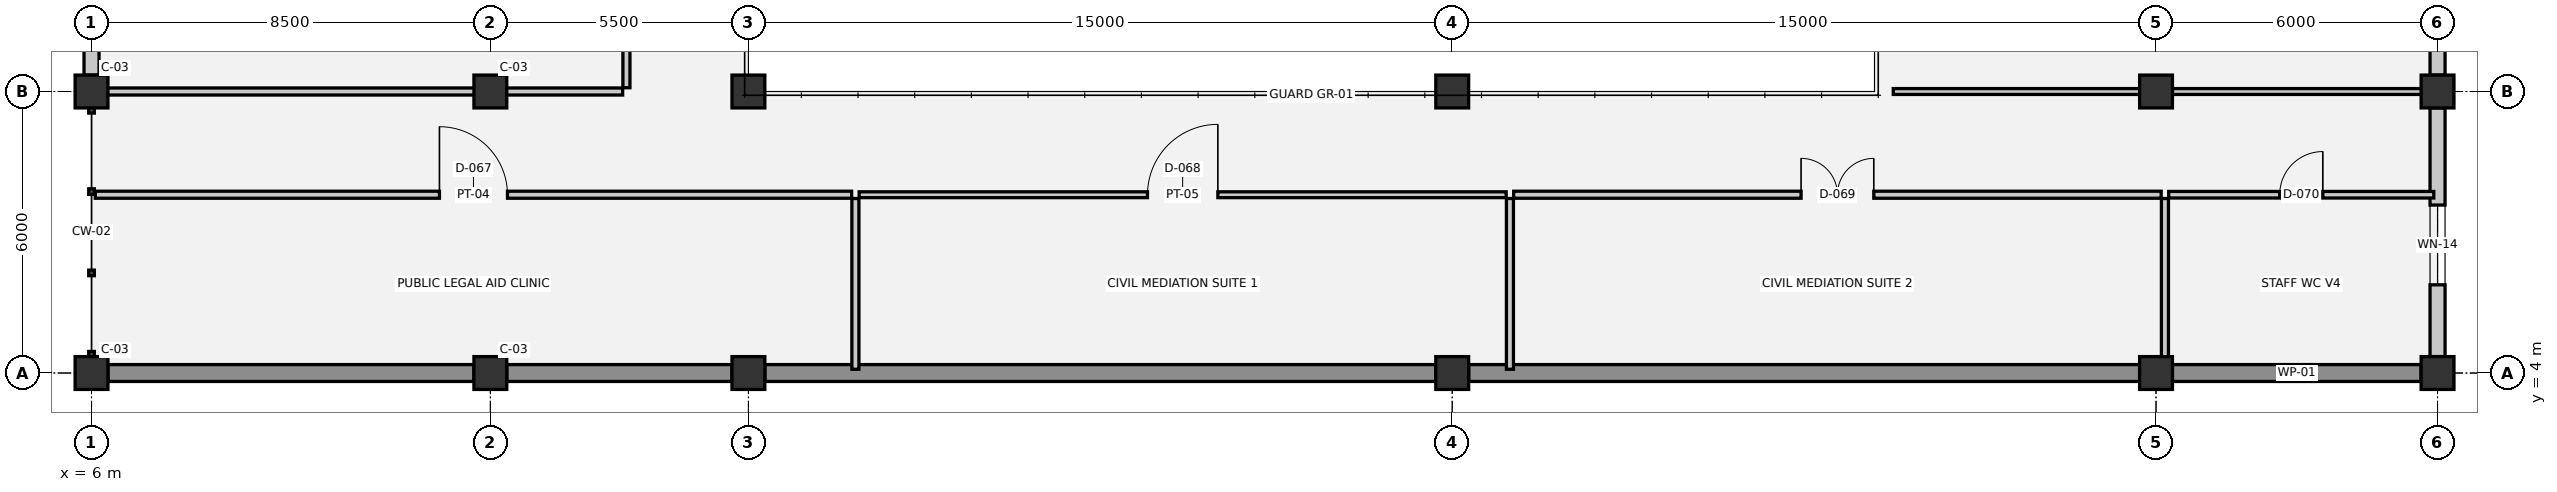
"""IFC4 building model, lengths in metres.
Left out: names, types, materials, properties, quantities, classifications, styles, units other than length and angle.
Written with IfcOpenShell. Run it as: python <this file> out.ifc"""

import sys

from ifc_helpers import new_model, si_unit, direction, frame, frame_2d, origin, origin_2d, place, context, subcontext, project, spatial, rectangle, extrude, element, fill, save


model = new_model("IFC4")
c1 = context("Model", 3, precision=1e-05, world=origin(), true_north=direction((0.0, 1.0)))
c2 = subcontext(c1, "Body", "Model", "MODEL_VIEW")
j1 = project(units=[si_unit("LENGTHUNIT", "METRE"), si_unit("PLANEANGLEUNIT", "RADIAN")], contexts=[c1])
p1 = place(None, origin())
s1 = spatial("IfcSite", under=j1, at=p1, CompositionType="ELEMENT")
p2 = place(p1, origin())
s2 = spatial("IfcBuilding", under=s1, at=p2, CompositionType="ELEMENT")
p3 = place(p2, frame((0.0, 0.0, 5.4)))
s3 = spatial("IfcBuildingStorey", under=s2, at=p3, CompositionType="ELEMENT", Elevation=5.4)
for number, where, z_axis, x_axis in (
    (1, (6.0, 4.0, 0.0), (0.0, 0.0, 1.0), (1.0, 0.0, 0.0)),
    (2, (6.0, 10.0, 0.0), (0.0, 0.0, 1.0), (1.0, 0.0, 0.0)),
    (3, (14.5, 4.0, 0.0), (0.0, 0.0, 1.0), (1.0, 0.0, 0.0)),
    (4, (14.5, 10.0, 0.0), (0.0, 0.0, 1.0), (1.0, 0.0, 0.0)),
    (5, (20.0, 4.0, 0.0), (0.0, 0.0, 1.0), (1.0, 0.0, 0.0)),
    (6, (20.0, 10.0, 0.0), (0.0, 0.0, 1.0), (1.0, 0.0, 0.0)),
    (7, (35.0, 4.0, 0.0), (0.0, 0.0, 1.0), (1.0, 0.0, 0.0)),
    (8, (35.0, 10.0, 0.0), (0.0, 0.0, 1.0), (1.0, 0.0, 0.0)),
    (9, (50.0, 4.0, 0.0), (0.0, 0.0, 1.0), (1.0, 0.0, 0.0)),
    (10, (50.0, 10.0, 0.0), (0.0, 0.0, 1.0), (1.0, 0.0, 0.0)),
    (11, (56.0, 4.0, 0.0), (0.0, 0.0, 1.0), (1.0, 0.0, 0.0)),
    (12, (56.0, 10.0, 0.0), (0.0, 0.0, 1.0), (1.0, 0.0, 0.0)),
):
    element("IfcColumn", number, at=place(p3, frame(where, z_axis=z_axis, x_axis=x_axis)), inside=s3, PredefinedType="COLUMN", context=c2, shape_type="SweptSolid", body=[
        extrude(rectangle(XDim=0.7, YDim=0.7, at=origin_2d()), origin(), (0.0, 0.0, 1.0), 4.5),
    ])
p4 = place(p3, frame((6.0, 10.35, 0.0), z_axis=(0.0, 0.0, 1.0), x_axis=(0.0, 1.0, 0.0)))
e13 = element("IfcWall", 13, at=p4, inside=s3, PredefinedType="SOLIDWALL", context=c2, shape_type="SweptSolid", body=[
    extrude(rectangle(XDim=6.3, YDim=0.32, at=frame_2d((3.15, 0.0))), origin(), (0.0, 0.0, 1.0), 3.26),
])
p5 = place(p4, frame((2.3, 0.0, 0.9)))
e14 = element("IfcOpeningElement", 14, at=p5, cuts=e13, PredefinedType="OPENING", context=c2, shape_type="SweptSolid", body=[
    extrude(rectangle(XDim=1.7, YDim=1.9, at=frame_2d((0.85, 0.95))), frame((0.0, 0.17, 0.0), z_axis=(0.0, -1.0, 0.0), x_axis=(1.0, 0.0, 0.0)), (0.0, 0.0, 1.0), 0.34),
])
p6 = place(p3, frame((56.0, 16.65, 0.0), z_axis=(0.0, 0.0, 1.0), x_axis=(0.0, -1.0, 0.0)))
e15 = element("IfcWall", 15, at=p6, inside=s3, PredefinedType="SOLIDWALL", context=c2, shape_type="SweptSolid", body=[
    extrude(rectangle(XDim=6.3, YDim=0.32, at=frame_2d((3.15, 0.0))), origin(), (0.0, 0.0, 1.0), 3.26),
])
p7 = place(p6, frame((1.925, 0.0, 0.0)))
e16 = element("IfcOpeningElement", 16, at=p7, cuts=e15, PredefinedType="OPENING", context=c2, shape_type="SweptSolid", body=[
    extrude(rectangle(XDim=1.65, YDim=2.2, at=frame_2d((0.825, 1.1))), frame((0.0, 0.17, 0.0), z_axis=(0.0, -1.0, 0.0), x_axis=(1.0, 0.0, 0.0)), (0.0, 0.0, 1.0), 0.34),
])
p8 = place(p3, frame((56.0, 9.65, 0.0), z_axis=(0.0, 0.0, 1.0), x_axis=(0.0, -1.0, 0.0)))
e17 = element("IfcWall", 17, at=p8, inside=s3, PredefinedType="SOLIDWALL", context=c2, shape_type="SweptSolid", body=[
    extrude(rectangle(XDim=5.3, YDim=0.32, at=frame_2d((2.65, 0.0))), origin(), (0.0, 0.0, 1.0), 3.26),
])
p9 = place(p8, frame((2.07, 0.0, 0.9)))
e18 = element("IfcOpeningElement", 18, at=p9, cuts=e17, PredefinedType="OPENING", context=c2, shape_type="SweptSolid", body=[
    extrude(rectangle(XDim=1.7, YDim=1.9, at=frame_2d((0.85, 0.95))), frame((0.0, 0.17, 0.0), z_axis=(0.0, -1.0, 0.0), x_axis=(1.0, 0.0, 0.0)), (0.0, 0.0, 1.0), 0.34),
])
p10 = place(p3, frame((55.65, 4.0, 0.0), z_axis=(0.0, 0.0, 1.0), x_axis=(-1.0, 0.0, 0.0)))
e19 = element("IfcWall", 19, at=p10, inside=s3, PredefinedType="SOLIDWALL", context=c2, shape_type="SweptSolid", body=[
    extrude(rectangle(XDim=5.3, YDim=0.36, at=frame_2d((2.65, 0.0))), origin(), (0.0, 0.0, 1.0), 4.24),
])
for number, where, z_axis, x_axis in (
    (20, (49.65, 4.0, 0.0), (0.0, 0.0, 1.0), (-1.0, 0.0, 0.0)),
    (21, (34.65, 4.0, 0.0), (0.0, 0.0, 1.0), (-1.0, 0.0, 0.0)),
):
    element("IfcWall", number, at=place(p3, frame(where, z_axis=z_axis, x_axis=x_axis)), inside=s3, PredefinedType="SOLIDWALL", context=c2, shape_type="SweptSolid", body=[
        extrude(rectangle(XDim=14.3, YDim=0.36, at=frame_2d((7.15, 0.0))), origin(), (0.0, 0.0, 1.0), 4.24),
    ])
p11 = place(p3, frame((19.65, 4.0, 0.0), z_axis=(0.0, 0.0, 1.0), x_axis=(-1.0, 0.0, 0.0)))
e22 = element("IfcWall", 22, at=p11, inside=s3, PredefinedType="SOLIDWALL", context=c2, shape_type="SweptSolid", body=[
    extrude(rectangle(XDim=4.8, YDim=0.36, at=frame_2d((2.4, 0.0))), origin(), (0.0, 0.0, 1.0), 4.24),
])
p12 = place(p3, frame((14.15, 4.0, 0.0), z_axis=(0.0, 0.0, 1.0), x_axis=(-1.0, 0.0, 0.0)))
e23 = element("IfcWall", 23, at=p12, inside=s3, PredefinedType="SOLIDWALL", context=c2, shape_type="SweptSolid", body=[
    extrude(rectangle(XDim=7.8, YDim=0.36, at=frame_2d((3.9, 0.0))), origin(), (0.0, 0.0, 1.0), 4.24),
])
p13 = place(p3, frame((6.08, 7.8, 0.0), z_axis=(0.0, 0.0, 1.0), x_axis=(1.0, 0.0, 0.0)))
e24 = element("IfcWall", 24, at=p13, inside=s3, PredefinedType="PARTITIONING", context=c2, shape_type="SweptSolid", body=[
    extrude(rectangle(XDim=16.12, YDim=0.15, at=frame_2d((8.06, 0.0))), origin(), (0.0, 0.0, 1.0), 4.14),
])
p14 = place(p13, frame((7.335, 0.0, 0.0)))
e25 = element("IfcOpeningElement", 25, at=p14, cuts=e24, PredefinedType="OPENING", context=c2, shape_type="SweptSolid", body=[
    extrude(rectangle(XDim=1.45, YDim=2.25, at=frame_2d((0.725, 1.125))), frame((0.0, 0.085, 0.0), z_axis=(0.0, -1.0, 0.0), x_axis=(1.0, 0.0, 0.0)), (0.0, 0.0, 1.0), 0.17),
])
p15 = place(p3, frame((22.36, 7.8, 0.0), z_axis=(0.0, 0.0, 1.0), x_axis=(1.0, 0.0, 0.0)))
e26 = element("IfcWall", 26, at=p15, inside=s3, PredefinedType="PARTITIONING", context=c2, shape_type="SweptSolid", body=[
    extrude(rectangle(XDim=13.79, YDim=0.125, at=frame_2d((6.895, 0.0))), origin(), (0.0, 0.0, 1.0), 4.14),
])
p16 = place(p15, frame((6.145, 0.0, 0.0)))
e27 = element("IfcOpeningElement", 27, at=p16, cuts=e26, PredefinedType="OPENING", context=c2, shape_type="SweptSolid", body=[
    extrude(rectangle(XDim=1.5, YDim=2.25, at=frame_2d((0.75, 1.125))), frame((0.0, 0.073, 0.0), z_axis=(0.0, -1.0, 0.0), x_axis=(1.0, 0.0, 0.0)), (0.0, 0.0, 1.0), 0.145),
])
p17 = place(p3, frame((36.31, 7.8, 0.0), z_axis=(0.0, 0.0, 1.0), x_axis=(1.0, 0.0, 0.0)))
e28 = element("IfcWall", 28, at=p17, inside=s3, PredefinedType="PARTITIONING", context=c2, shape_type="SweptSolid", body=[
    extrude(rectangle(XDim=13.8, YDim=0.15, at=frame_2d((6.9, 0.0))), origin(), (0.0, 0.0, 1.0), 4.14),
])
p18 = place(p17, frame((6.125, 0.0, 0.0)))
e29 = element("IfcOpeningElement", 29, at=p18, cuts=e28, PredefinedType="OPENING", context=c2, shape_type="SweptSolid", body=[
    extrude(rectangle(XDim=1.55, YDim=2.25, at=frame_2d((0.775, 1.125))), frame((0.0, 0.085, 0.0), z_axis=(0.0, -1.0, 0.0), x_axis=(1.0, 0.0, 0.0)), (0.0, 0.0, 1.0), 0.17),
])
p19 = place(p3, frame((50.27, 7.8, 0.0), z_axis=(0.0, 0.0, 1.0), x_axis=(1.0, 0.0, 0.0)))
e30 = element("IfcWall", 30, at=p19, inside=s3, PredefinedType="PLUMBINGWALL", context=c2, shape_type="SweptSolid", body=[
    extrude(rectangle(XDim=5.65, YDim=0.14, at=frame_2d((2.825, 0.0))), origin(), (0.0, 0.0, 1.0), 4.14),
])
p20 = place(p19, frame((2.365, 0.0, 0.0)))
e31 = element("IfcOpeningElement", 31, at=p20, cuts=e30, PredefinedType="OPENING", context=c2, shape_type="SweptSolid", body=[
    extrude(rectangle(XDim=0.92, YDim=2.1, at=frame_2d((0.46, 1.05))), frame((0.0, 0.08, 0.0), z_axis=(0.0, -1.0, 0.0), x_axis=(1.0, 0.0, 0.0)), (0.0, 0.0, 1.0), 0.16),
])
p21 = place(p3, frame((6.08, 10.0, 0.0), z_axis=(0.0, 0.0, 1.0), x_axis=(1.0, 0.0, 0.0)))
e32 = element("IfcWall", 32, at=p21, inside=s3, PredefinedType="PARTITIONING", context=c2, shape_type="SweptSolid", body=[
    extrude(rectangle(XDim=11.24, YDim=0.15, at=frame_2d((5.62, 0.0))), origin(), (0.0, 0.0, 1.0), 3.53),
])
p22 = place(p3, frame((44.4, 10.0, 0.0), z_axis=(0.0, 0.0, 1.0), x_axis=(1.0, 0.0, 0.0)))
e33 = element("IfcWall", 33, at=p22, inside=s3, PredefinedType="PARTITIONING", context=c2, shape_type="SweptSolid", body=[
    extrude(rectangle(XDim=5.95, YDim=0.125, at=frame_2d((2.975, 0.0))), origin(), (0.0, 0.0, 1.0), 3.28),
])
p23 = place(p3, frame((50.35, 10.0, 0.0), z_axis=(0.0, 0.0, 1.0), x_axis=(1.0, 0.0, 0.0)))
e34 = element("IfcWall", 34, at=p23, inside=s3, PredefinedType="PARTITIONING", context=c2, shape_type="SweptSolid", body=[
    extrude(rectangle(XDim=5.57, YDim=0.125, at=frame_2d((2.785, 0.0))), origin(), (0.0, 0.0, 1.0), 3.53),
])
p24 = place(p3, frame((17.4, 10.08, 0.0), z_axis=(0.0, 0.0, 1.0), x_axis=(0.0, 1.0, 0.0)))
e35 = element("IfcWall", 35, at=p24, inside=s3, PredefinedType="PARTITIONING", context=c2, shape_type="SweptSolid", body=[
    extrude(rectangle(XDim=14.72, YDim=0.15, at=frame_2d((7.36, 0.0))), origin(), (0.0, 0.0, 1.0), 4.14),
])
p25 = place(p24, frame((6.68, 0.0, 0.0)))
e36 = element("IfcOpeningElement", 36, at=p25, cuts=e35, PredefinedType="OPENING", context=c2, shape_type="SweptSolid", body=[
    extrude(rectangle(XDim=1.36, YDim=2.2, at=frame_2d((0.68, 1.1))), frame((0.0, 0.085, 0.0), z_axis=(0.0, -1.0, 0.0), x_axis=(1.0, 0.0, 0.0)), (0.0, 0.0, 1.0), 0.17),
])
for number, where, z_axis, x_axis in (
    (37, (22.28, 4.08, 0.0), (0.0, 0.0, 1.0), (0.0, 1.0, 0.0)),
    (38, (36.23, 4.08, 0.0), (0.0, 0.0, 1.0), (0.0, 1.0, 0.0)),
):
    element("IfcWall", number, at=place(p3, frame(where, z_axis=z_axis, x_axis=x_axis)), inside=s3, PredefinedType="PARTITIONING", context=c2, shape_type="SweptSolid", body=[
        extrude(rectangle(XDim=3.64, YDim=0.15, at=frame_2d((1.82, 0.0))), origin(), (0.0, 0.0, 1.0), 4.14),
    ])
p26 = place(p3, frame((50.19, 4.08, 0.0), z_axis=(0.0, 0.0, 1.0), x_axis=(0.0, 1.0, 0.0)))
e39 = element("IfcWall", 39, at=p26, inside=s3, PredefinedType="PARTITIONING", context=c2, shape_type="SweptSolid", body=[
    extrude(rectangle(XDim=3.64, YDim=0.15, at=frame_2d((1.82, 0.0))), origin(), (0.0, 0.0, 1.0), 3.68),
])
p27 = place(p9, origin())
e40 = element("IfcWindow", 40, at=p27, inside=s3, PartitioningType="SINGLE_PANEL", PredefinedType="WINDOW", context=c2, shape_type="SweptSolid", body=[
    extrude(rectangle(XDim=1.7, YDim=1.9, at=frame_2d((0.85, 0.95))), frame((0.0, 0.03, 0.0), z_axis=(0.0, -1.0, 0.0), x_axis=(1.0, 0.0, 0.0)), (0.0, 0.0, 1.0), 0.06),
])
fill(e18, e40)
p28 = place(p14, origin())
e41 = element("IfcDoor", 41, at=p28, inside=s3, OperationType="SINGLE_SWING_LEFT", PredefinedType="DOOR", context=c2, shape_type="SweptSolid", body=[
    extrude(rectangle(XDim=1.45, YDim=2.25, at=frame_2d((0.725, 1.125))), frame((0.0, 0.025, 0.0), z_axis=(0.0, -1.0, 0.0), x_axis=(1.0, 0.0, 0.0)), (0.0, 0.0, 1.0), 0.05),
])
fill(e25, e41)
p29 = place(p16, origin())
e42 = element("IfcDoor", 42, at=p29, inside=s3, OperationType="SINGLE_SWING_RIGHT", PredefinedType="DOOR", context=c2, shape_type="SweptSolid", body=[
    extrude(rectangle(XDim=1.5, YDim=2.25, at=frame_2d((0.75, 1.125))), frame((0.0, 0.025, 0.0), z_axis=(0.0, -1.0, 0.0), x_axis=(1.0, 0.0, 0.0)), (0.0, 0.0, 1.0), 0.05),
])
fill(e27, e42)
p30 = place(p18, origin())
e43 = element("IfcDoor", 43, at=p30, inside=s3, OperationType="DOUBLE_DOOR_SINGLE_SWING", PredefinedType="DOOR", context=c2, shape_type="SweptSolid", body=[
    extrude(rectangle(XDim=1.55, YDim=2.25, at=frame_2d((0.775, 1.125))), frame((0.0, 0.025, 0.0), z_axis=(0.0, -1.0, 0.0), x_axis=(1.0, 0.0, 0.0)), (0.0, 0.0, 1.0), 0.05),
])
fill(e29, e43)
p31 = place(p20, origin())
e44 = element("IfcDoor", 44, at=p31, inside=s3, OperationType="SINGLE_SWING_RIGHT", PredefinedType="DOOR", context=c2, shape_type="SweptSolid", body=[
    extrude(rectangle(XDim=0.92, YDim=2.1, at=frame_2d((0.46, 1.05))), frame((0.0, 0.025, 0.0), z_axis=(0.0, -1.0, 0.0), x_axis=(1.0, 0.0, 0.0)), (0.0, 0.0, 1.0), 0.05),
])
fill(e31, e44)
save(model, sys.argv[1])
